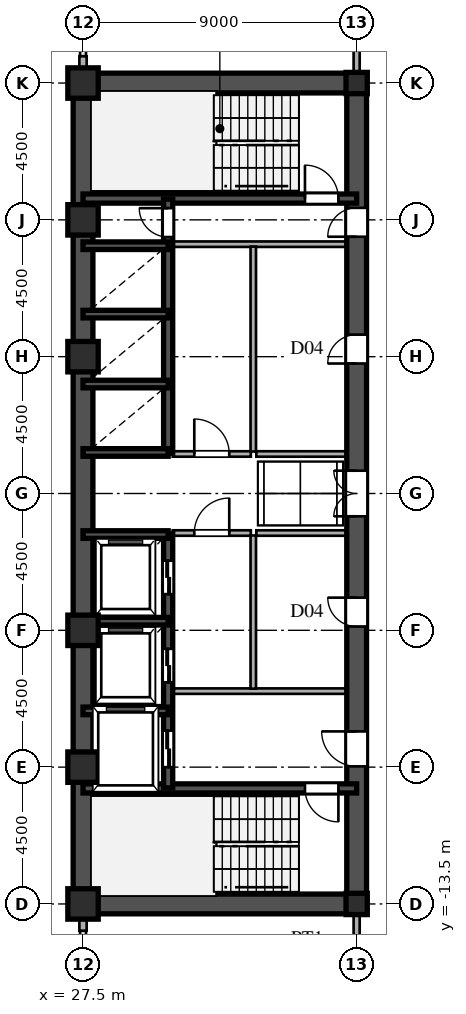
"""IFC4 building model, lengths in metres.
Left out: names, types, materials, properties, quantities, classifications, styles, units other than length and angle.
Written with IfcOpenShell. Run it as: python <this file> out.ifc"""

import sys

from ifc_helpers import new_model, si_unit, direction, frame, frame_2d, origin, origin_2d, place, context, subcontext, project, spatial, rectangle, hollow_rectangle, i_section, extrude, source, transform, mapped, element, fill, save


model = new_model("IFC4")
c1 = context("Model", 3, precision=1e-05, world=origin(), true_north=direction((0.0, 1.0)))
c2 = subcontext(c1, "Body", "Model", "MODEL_VIEW")
j1 = project(units=[si_unit("LENGTHUNIT", "METRE"), si_unit("PLANEANGLEUNIT", "RADIAN")], contexts=[c1])
p1 = place(None, origin())
s1 = spatial("IfcSite", under=j1, at=p1, CompositionType="ELEMENT")
p2 = place(p1, origin())
s2 = spatial("IfcBuilding", under=s1, at=p2, CompositionType="ELEMENT")
p3 = place(p2, frame((0.0, 0.0, 132.0)))
s3 = spatial("IfcBuildingStorey", under=s2, at=p3, CompositionType="ELEMENT", Elevation=132.0)
m1 = source(origin(), c2, "Body", "SweptSolid", [
    extrude(hollow_rectangle(XDim=1.0, YDim=1.0, WallThickness=0.042, at=origin_2d()), origin(), (0.0, 0.0, 1.0), 3.6),
])
for number, where, z_axis, x_axis in (
    (1, (27.5, -13.5, 0.0), (0.0, 0.0, 1.0), (1.0, 0.0, 0.0)),
    (2, (27.5, -9.0, 0.0), (0.0, 0.0, 1.0), (1.0, 0.0, 0.0)),
    (3, (27.5, -4.5, 0.0), (0.0, 0.0, 1.0), (1.0, 0.0, 0.0)),
    (4, (27.5, 4.5, 0.0), (0.0, 0.0, 1.0), (1.0, 0.0, 0.0)),
    (5, (27.5, 9.0, 0.0), (0.0, 0.0, 1.0), (1.0, 0.0, 0.0)),
    (6, (27.5, 13.5, 0.0), (0.0, 0.0, 1.0), (1.0, 0.0, 0.0)),
):
    element("IfcColumn", number, at=place(p3, frame(where, z_axis=z_axis, x_axis=x_axis)), inside=s3, PredefinedType="COLUMN", context=c2, shape_type="MappedRepresentation", body=[
        mapped(m1, transform((0.0, 0.0, 0.0), scale=1.0)),
    ])
m2 = source(origin(), c2, "Body", "SweptSolid", [
    extrude(i_section(OverallWidth=0.7, OverallDepth=0.7, WebThickness=0.028, FlangeThickness=0.045, at=origin_2d()), origin(), (0.0, 0.0, 1.0), 3.6),
])
for number, where, z_axis, x_axis in (
    (7, (36.5, -13.5, 0.0), (0.0, 0.0, 1.0), (1.0, 0.0, 0.0)),
    (8, (36.5, 13.5, 0.0), (0.0, 0.0, 1.0), (1.0, 0.0, 0.0)),
):
    element("IfcColumn", number, at=place(p3, frame(where, z_axis=z_axis, x_axis=x_axis)), inside=s3, PredefinedType="COLUMN", context=c2, shape_type="MappedRepresentation", body=[
        mapped(m2, transform((0.0, 0.0, 0.0), scale=1.0)),
    ])
for number, where, z_axis, x_axis in (
    (9, (27.5, -14.38, 0.0), (0.0, 0.0, 1.0), (0.0, 1.0, 0.0)),
    (10, (27.5, 13.83, 0.0), (0.0, 0.0, 1.0), (0.0, 1.0, 0.0)),
):
    element("IfcWall", number, at=place(p3, frame(where, z_axis=z_axis, x_axis=x_axis)), inside=s3, PredefinedType="SOLIDWALL", context=c2, shape_type="SweptSolid", body=[
        extrude(rectangle(XDim=0.55, YDim=0.24, at=frame_2d((0.275, 0.0))), origin(), (0.0, 0.0, 1.0), 2.79),
    ])
for number, where, z_axis, x_axis in (
    (11, (27.5, -13.5, 0.0), (0.0, 0.0, 1.0), (0.0, 1.0, 0.0)),
    (12, (27.5, 1.3, 0.0), (0.0, 0.0, 1.0), (0.0, 1.0, 0.0)),
):
    element("IfcWall", number, at=place(p3, frame(where, z_axis=z_axis, x_axis=x_axis)), inside=s3, PredefinedType="SHEAR", context=c2, shape_type="SweptSolid", body=[
        extrude(rectangle(XDim=12.2, YDim=0.65, at=frame_2d((6.1, 0.0))), origin(), (0.0, 0.0, 1.0), 3.34),
    ])
p4 = place(p3, frame((27.5, -1.3, 0.0), z_axis=(0.0, 0.0, 1.0), x_axis=(0.0, 1.0, 0.0)))
e13 = element("IfcWall", 13, at=p4, inside=s3, PredefinedType="SHEAR", context=c2, shape_type="SweptSolid", body=[
    extrude(rectangle(XDim=2.6, YDim=0.65, at=frame_2d((1.3, 0.0))), origin(), (0.0, 0.0, 1.0), 3.34),
])
for number, where, z_axis, x_axis in (
    (14, (27.5, -13.5, 0.0), (0.0, 0.0, 1.0), (1.0, 0.0, 0.0)),
    (15, (27.5, 13.5, 0.0), (0.0, 0.0, 1.0), (1.0, 0.0, 0.0)),
):
    element("IfcWall", number, at=place(p3, frame(where, z_axis=z_axis, x_axis=x_axis)), inside=s3, PredefinedType="SHEAR", context=c2, shape_type="SweptSolid", body=[
        extrude(rectangle(XDim=9.0, YDim=0.65, at=frame_2d((4.5, 0.0))), origin(), (0.0, 0.0, 1.0), 3.34),
    ])
p5 = place(p3, frame((36.5, -13.65, 0.0), z_axis=(0.0, 0.0, 1.0), x_axis=(0.0, 1.0, 0.0)))
e16 = element("IfcWall", 16, at=p5, inside=s3, PredefinedType="SHEAR", context=c2, shape_type="SweptSolid", body=[
    extrude(rectangle(XDim=7.15, YDim=0.65, at=frame_2d((3.575, 0.0))), origin(), (0.0, 0.0, 1.0), 3.34),
])
p6 = place(p5, frame((4.675, 0.0, 0.0)))
e17 = element("IfcOpeningElement", 17, at=p6, cuts=e16, PredefinedType="OPENING", context=c2, shape_type="SweptSolid", body=[
    extrude(rectangle(XDim=1.15, YDim=2.2, at=frame_2d((0.575, 1.1))), frame((0.0, 0.335, 0.0), z_axis=(0.0, -1.0, 0.0), x_axis=(1.0, 0.0, 0.0)), (0.0, 0.0, 1.0), 0.67),
])
p7 = place(p3, frame((36.5, -1.3, 0.0), z_axis=(0.0, 0.0, 1.0), x_axis=(0.0, 1.0, 0.0)))
e18 = element("IfcWall", 18, at=p7, inside=s3, PredefinedType="SHEAR", context=c2, shape_type="SweptSolid", body=[
    extrude(rectangle(XDim=2.6, YDim=0.65, at=frame_2d((1.3, 0.0))), origin(), (0.0, 0.0, 1.0), 3.34),
])
p8 = place(p7, frame((0.55, 0.0, 0.0)))
e19 = element("IfcOpeningElement", 19, at=p8, cuts=e18, PredefinedType="OPENING", context=c2, shape_type="SweptSolid", body=[
    extrude(rectangle(XDim=1.5, YDim=2.3, at=frame_2d((0.75, 1.15))), frame((0.0, 0.335, 0.0), z_axis=(0.0, -1.0, 0.0), x_axis=(1.0, 0.0, 0.0)), (0.0, 0.0, 1.0), 0.67),
])
p9 = place(p3, frame((36.5, 8.2, 0.0), z_axis=(0.0, 0.0, 1.0), x_axis=(0.0, 1.0, 0.0)))
e20 = element("IfcWall", 20, at=p9, inside=s3, PredefinedType="SHEAR", context=c2, shape_type="SweptSolid", body=[
    extrude(rectangle(XDim=5.45, YDim=0.65, at=frame_2d((2.725, 0.0))), origin(), (0.0, 0.0, 1.0), 3.34),
])
p10 = place(p9, frame((0.245, 0.0, 0.0)))
e21 = element("IfcOpeningElement", 21, at=p10, cuts=e20, PredefinedType="OPENING", context=c2, shape_type="SweptSolid", body=[
    extrude(rectangle(XDim=0.95, YDim=2.15, at=frame_2d((0.475, 1.075))), frame((0.0, 0.335, 0.0), z_axis=(0.0, -1.0, 0.0), x_axis=(1.0, 0.0, 0.0)), (0.0, 0.0, 1.0), 0.67),
])
p11 = place(p3, frame((36.5, -6.5, 0.0), z_axis=(0.0, 0.0, 1.0), x_axis=(0.0, 1.0, 0.0)))
e22 = element("IfcWall", 22, at=p11, inside=s3, PredefinedType="SHEAR", context=c2, shape_type="SweptSolid", body=[
    extrude(rectangle(XDim=5.2, YDim=0.65, at=frame_2d((2.6, 0.0))), origin(), (0.0, 0.0, 1.0), 3.34),
])
p12 = place(p11, frame((2.125, 0.0, 0.0)))
e23 = element("IfcOpeningElement", 23, at=p12, cuts=e22, PredefinedType="OPENING", context=c2, shape_type="SweptSolid", body=[
    extrude(rectangle(XDim=0.95, YDim=2.15, at=frame_2d((0.475, 1.075))), frame((0.0, 0.335, 0.0), z_axis=(0.0, -1.0, 0.0), x_axis=(1.0, 0.0, 0.0)), (0.0, 0.0, 1.0), 0.67),
])
p13 = place(p3, frame((36.5, 1.3, 0.0), z_axis=(0.0, 0.0, 1.0), x_axis=(0.0, 1.0, 0.0)))
e24 = element("IfcWall", 24, at=p13, inside=s3, PredefinedType="SHEAR", context=c2, shape_type="SweptSolid", body=[
    extrude(rectangle(XDim=6.9, YDim=0.65, at=frame_2d((3.45, 0.0))), origin(), (0.0, 0.0, 1.0), 3.34),
])
p14 = place(p13, frame((2.975, 0.0, 0.0)))
e25 = element("IfcOpeningElement", 25, at=p14, cuts=e24, PredefinedType="OPENING", context=c2, shape_type="SweptSolid", body=[
    extrude(rectangle(XDim=0.95, YDim=2.15, at=frame_2d((0.475, 1.075))), frame((0.0, 0.335, 0.0), z_axis=(0.0, -1.0, 0.0), x_axis=(1.0, 0.0, 0.0)), (0.0, 0.0, 1.0), 0.67),
])
p15 = place(p3, frame((27.5, -9.7, 0.0), z_axis=(0.0, 0.0, 1.0), x_axis=(1.0, 0.0, 0.0)))
e26 = element("IfcWall", 26, at=p15, inside=s3, PredefinedType="SHEAR", context=c2, shape_type="SweptSolid", body=[
    extrude(rectangle(XDim=9.0, YDim=0.3, at=frame_2d((4.5, 0.0))), origin(), (0.0, 0.0, 1.0), 3.34),
])
p16 = place(p15, frame((7.3, 0.0, 0.0)))
e27 = element("IfcOpeningElement", 27, at=p16, cuts=e26, PredefinedType="OPENING", context=c2, shape_type="SweptSolid", body=[
    extrude(rectangle(XDim=1.1, YDim=2.2, at=frame_2d((0.55, 1.1))), frame((0.0, 0.16, 0.0), z_axis=(0.0, -1.0, 0.0), x_axis=(1.0, 0.0, 0.0)), (0.0, 0.0, 1.0), 0.32),
])
p17 = place(p3, frame((27.5, 9.7, 0.0), z_axis=(0.0, 0.0, 1.0), x_axis=(1.0, 0.0, 0.0)))
e28 = element("IfcWall", 28, at=p17, inside=s3, PredefinedType="SHEAR", context=c2, shape_type="SweptSolid", body=[
    extrude(rectangle(XDim=9.0, YDim=0.3, at=frame_2d((4.5, 0.0))), origin(), (0.0, 0.0, 1.0), 3.34),
])
p18 = place(p17, frame((7.3, 0.0, 0.0)))
e29 = element("IfcOpeningElement", 29, at=p18, cuts=e28, PredefinedType="OPENING", context=c2, shape_type="SweptSolid", body=[
    extrude(rectangle(XDim=1.1, YDim=2.2, at=frame_2d((0.55, 1.1))), frame((0.0, 0.16, 0.0), z_axis=(0.0, -1.0, 0.0), x_axis=(1.0, 0.0, 0.0)), (0.0, 0.0, 1.0), 0.32),
])
for number, where, z_axis, x_axis in (
    (30, (27.5, -7.15, 0.0), (0.0, 0.0, 1.0), (1.0, 0.0, 0.0)),
    (31, (27.5, -4.2, 0.0), (0.0, 0.0, 1.0), (1.0, 0.0, 0.0)),
    (32, (27.5, -1.35, 0.0), (0.0, 0.0, 1.0), (1.0, 0.0, 0.0)),
    (33, (27.5, 1.35, 0.0), (0.0, 0.0, 1.0), (1.0, 0.0, 0.0)),
    (34, (27.5, 3.6, 0.0), (0.0, 0.0, 1.0), (1.0, 0.0, 0.0)),
    (35, (27.5, 5.9, 0.0), (0.0, 0.0, 1.0), (1.0, 0.0, 0.0)),
    (36, (27.5, 8.15, 0.0), (0.0, 0.0, 1.0), (1.0, 0.0, 0.0)),
):
    element("IfcWall", number, at=place(p3, frame(where, z_axis=z_axis, x_axis=x_axis)), inside=s3, PredefinedType="SHEAR", context=c2, shape_type="SweptSolid", body=[
        extrude(rectangle(XDim=2.8, YDim=0.25, at=frame_2d((1.4, 0.0))), origin(), (0.0, 0.0, 1.0), 3.34),
    ])
p19 = place(p3, frame((30.3, -9.68, 0.0), z_axis=(0.0, 0.0, 1.0), x_axis=(0.0, 1.0, 0.0)))
e37 = element("IfcWall", 37, at=p19, inside=s3, PredefinedType="SHEAR", context=c2, shape_type="SweptSolid", body=[
    extrude(rectangle(XDim=2.56, YDim=0.3, at=frame_2d((1.28, 0.0))), origin(), (0.0, 0.0, 1.0), 3.34),
])
p20 = place(p19, frame((0.68, 0.0, 0.0)))
e38 = element("IfcOpeningElement", 38, at=p20, cuts=e37, PredefinedType="OPENING", context=c2, shape_type="SweptSolid", body=[
    extrude(rectangle(XDim=1.2, YDim=2.25, at=frame_2d((0.6, 1.125))), frame((0.0, 0.16, 0.0), z_axis=(0.0, -1.0, 0.0), x_axis=(1.0, 0.0, 0.0)), (0.0, 0.0, 1.0), 0.32),
])
p21 = place(p3, frame((30.3, -7.12, 0.0), z_axis=(0.0, 0.0, 1.0), x_axis=(0.0, 1.0, 0.0)))
e39 = element("IfcWall", 39, at=p21, inside=s3, PredefinedType="SHEAR", context=c2, shape_type="SweptSolid", body=[
    extrude(rectangle(XDim=2.92, YDim=0.3, at=frame_2d((1.46, 0.0))), origin(), (0.0, 0.0, 1.0), 3.34),
])
p22 = place(p21, frame((0.91, 0.0, 0.0)))
e40 = element("IfcOpeningElement", 40, at=p22, cuts=e39, PredefinedType="OPENING", context=c2, shape_type="SweptSolid", body=[
    extrude(rectangle(XDim=1.1, YDim=2.2, at=frame_2d((0.55, 1.1))), frame((0.0, 0.16, 0.0), z_axis=(0.0, -1.0, 0.0), x_axis=(1.0, 0.0, 0.0)), (0.0, 0.0, 1.0), 0.32),
])
p23 = place(p3, frame((30.3, -4.2, 0.0), z_axis=(0.0, 0.0, 1.0), x_axis=(0.0, 1.0, 0.0)))
e41 = element("IfcWall", 41, at=p23, inside=s3, PredefinedType="SHEAR", context=c2, shape_type="SweptSolid", body=[
    extrude(rectangle(XDim=2.88, YDim=0.3, at=frame_2d((1.44, 0.0))), origin(), (0.0, 0.0, 1.0), 3.34),
])
p24 = place(p23, frame((0.89, 0.0, 0.0)))
e42 = element("IfcOpeningElement", 42, at=p24, cuts=e41, PredefinedType="OPENING", context=c2, shape_type="SweptSolid", body=[
    extrude(rectangle(XDim=1.1, YDim=2.2, at=frame_2d((0.55, 1.1))), frame((0.0, 0.16, 0.0), z_axis=(0.0, -1.0, 0.0), x_axis=(1.0, 0.0, 0.0)), (0.0, 0.0, 1.0), 0.32),
])
p25 = place(p3, frame((30.3, 1.32, 0.0), z_axis=(0.0, 0.0, 1.0), x_axis=(0.0, 1.0, 0.0)))
e43 = element("IfcWall", 43, at=p25, inside=s3, PredefinedType="SHEAR", context=c2, shape_type="SweptSolid", body=[
    extrude(rectangle(XDim=2.28, YDim=0.3, at=frame_2d((1.14, 0.0))), origin(), (0.0, 0.0, 1.0), 3.34),
])
p26 = place(p3, frame((30.3, 3.6, 0.0), z_axis=(0.0, 0.0, 1.0), x_axis=(0.0, 1.0, 0.0)))
e44 = element("IfcWall", 44, at=p26, inside=s3, PredefinedType="SHEAR", context=c2, shape_type="SweptSolid", body=[
    extrude(rectangle(XDim=2.3, YDim=0.3, at=frame_2d((1.15, 0.0))), origin(), (0.0, 0.0, 1.0), 3.34),
])
p27 = place(p3, frame((30.3, 5.9, 0.0), z_axis=(0.0, 0.0, 1.0), x_axis=(0.0, 1.0, 0.0)))
e45 = element("IfcWall", 45, at=p27, inside=s3, PredefinedType="SHEAR", context=c2, shape_type="SweptSolid", body=[
    extrude(rectangle(XDim=2.25, YDim=0.3, at=frame_2d((1.125, 0.0))), origin(), (0.0, 0.0, 1.0), 3.34),
])
p28 = place(p3, frame((30.3, 8.15, 0.0), z_axis=(0.0, 0.0, 1.0), x_axis=(0.0, 1.0, 0.0)))
e46 = element("IfcWall", 46, at=p28, inside=s3, PredefinedType="SHEAR", context=c2, shape_type="SweptSolid", body=[
    extrude(rectangle(XDim=1.53, YDim=0.3, at=frame_2d((0.765, 0.0))), origin(), (0.0, 0.0, 1.0), 3.34),
])
p29 = place(p28, frame((0.285, 0.0, 0.0)))
e47 = element("IfcOpeningElement", 47, at=p29, cuts=e46, PredefinedType="OPENING", context=c2, shape_type="SweptSolid", body=[
    extrude(rectangle(XDim=0.95, YDim=2.15, at=frame_2d((0.475, 1.075))), frame((0.0, 0.16, 0.0), z_axis=(0.0, -1.0, 0.0), x_axis=(1.0, 0.0, 0.0)), (0.0, 0.0, 1.0), 0.32),
])
for number, where, z_axis, x_axis in (
    (48, (30.45, -6.5, 0.0), (0.0, 0.0, 1.0), (1.0, 0.0, 0.0)),
    (49, (30.45, 8.2, 0.0), (0.0, 0.0, 1.0), (1.0, 0.0, 0.0)),
):
    element("IfcWall", number, at=place(p3, frame(where, z_axis=z_axis, x_axis=x_axis)), inside=s3, PredefinedType="PARTITIONING", context=c2, shape_type="SweptSolid", body=[
        extrude(rectangle(XDim=5.7, YDim=0.18, at=frame_2d((2.85, 0.0))), origin(), (0.0, 0.0, 1.0), 3.34),
    ])
p30 = place(p3, frame((33.1, -6.42, 0.0), z_axis=(0.0, 0.0, 1.0), x_axis=(0.0, 1.0, 0.0)))
e50 = element("IfcWall", 50, at=p30, inside=s3, PredefinedType="PARTITIONING", context=c2, shape_type="SweptSolid", body=[
    extrude(rectangle(XDim=5.04, YDim=0.18, at=frame_2d((2.52, 0.0))), origin(), (0.0, 0.0, 1.0), 3.34),
])
p31 = place(p3, frame((33.1, 1.38, 0.0), z_axis=(0.0, 0.0, 1.0), x_axis=(0.0, 1.0, 0.0)))
e51 = element("IfcWall", 51, at=p31, inside=s3, PredefinedType="PARTITIONING", context=c2, shape_type="SweptSolid", body=[
    extrude(rectangle(XDim=6.74, YDim=0.18, at=frame_2d((3.37, 0.0))), origin(), (0.0, 0.0, 1.0), 3.34),
])
p32 = place(p3, frame((30.45, -1.3, 0.0), z_axis=(0.0, 0.0, 1.0), x_axis=(1.0, 0.0, 0.0)))
e52 = element("IfcWall", 52, at=p32, inside=s3, PredefinedType="PARTITIONING", context=c2, shape_type="SweptSolid", body=[
    extrude(rectangle(XDim=2.57, YDim=0.18, at=frame_2d((1.285, 0.0))), origin(), (0.0, 0.0, 1.0), 3.34),
])
p33 = place(p32, frame((0.71, 0.0, 0.0)))
e53 = element("IfcOpeningElement", 53, at=p33, cuts=e52, PredefinedType="OPENING", context=c2, shape_type="SweptSolid", body=[
    extrude(rectangle(XDim=1.15, YDim=2.2, at=frame_2d((0.575, 1.1))), frame((0.0, 0.1, 0.0), z_axis=(0.0, -1.0, 0.0), x_axis=(1.0, 0.0, 0.0)), (0.0, 0.0, 1.0), 0.2),
])
p34 = place(p3, frame((30.45, 1.3, 0.0), z_axis=(0.0, 0.0, 1.0), x_axis=(1.0, 0.0, 0.0)))
e54 = element("IfcWall", 54, at=p34, inside=s3, PredefinedType="PARTITIONING", context=c2, shape_type="SweptSolid", body=[
    extrude(rectangle(XDim=2.57, YDim=0.18, at=frame_2d((1.285, 0.0))), origin(), (0.0, 0.0, 1.0), 3.34),
])
p35 = place(p34, frame((0.71, 0.0, 0.0)))
e55 = element("IfcOpeningElement", 55, at=p35, cuts=e54, PredefinedType="OPENING", context=c2, shape_type="SweptSolid", body=[
    extrude(rectangle(XDim=1.15, YDim=2.2, at=frame_2d((0.575, 1.1))), frame((0.0, 0.1, 0.0), z_axis=(0.0, -1.0, 0.0), x_axis=(1.0, 0.0, 0.0)), (0.0, 0.0, 1.0), 0.2),
])
for number, where, z_axis, x_axis in (
    (56, (33.2, -1.3, 0.0), (0.0, 0.0, 1.0), (1.0, 0.0, 0.0)),
    (57, (33.2, 1.3, 0.0), (0.0, 0.0, 1.0), (1.0, 0.0, 0.0)),
):
    element("IfcWall", number, at=place(p3, frame(where, z_axis=z_axis, x_axis=x_axis)), inside=s3, PredefinedType="PARTITIONING", context=c2, shape_type="SweptSolid", body=[
        extrude(rectangle(XDim=2.95, YDim=0.18, at=frame_2d((1.475, 0.0))), origin(), (0.0, 0.0, 1.0), 3.34),
    ])
for number, where, z_axis, x_axis in (
    (58, (36.5, -15.515, 0.0), (0.0, 0.0, 1.0), (0.0, 1.0, 0.0)),
    (59, (36.5, 13.83, 0.0), (0.0, 0.0, 1.0), (0.0, 1.0, 0.0)),
):
    element("IfcWall", number, at=place(p3, frame(where, z_axis=z_axis, x_axis=x_axis)), inside=s3, PredefinedType="PARTITIONING", context=c2, shape_type="SweptSolid", body=[
        extrude(rectangle(XDim=1.685, YDim=0.2, at=frame_2d((0.842, 0.0))), origin(), (0.0, 0.0, 1.0), 2.44),
    ])
m3 = source(origin(), c2, "Body", "SweptSolid", [
    extrude(rectangle(XDim=1.15, YDim=2.2, at=frame_2d((0.575, 1.1))), frame((0.0, 0.025, 0.0), z_axis=(0.0, -1.0, 0.0), x_axis=(1.0, 0.0, 0.0)), (0.0, 0.0, 1.0), 0.05),
])
p36 = place(p6, origin())
e60 = element("IfcDoor", 60, at=p36, inside=s3, OperationType="SINGLE_SWING_RIGHT", PredefinedType="DOOR", context=c2, shape_type="MappedRepresentation", body=[
    mapped(m3, transform((0.0, 0.0, 0.0), scale=1.0)),
])
fill(e17, e60)
m4 = source(origin(), c2, "Body", "SweptSolid", [
    extrude(rectangle(XDim=1.5, YDim=2.3, at=frame_2d((0.75, 1.15))), frame((0.0, 0.025, 0.0), z_axis=(0.0, -1.0, 0.0), x_axis=(1.0, 0.0, 0.0)), (0.0, 0.0, 1.0), 0.05),
])
p37 = place(p8, origin())
e61 = element("IfcDoor", 61, at=p37, inside=s3, OperationType="DOUBLE_SWING_LEFT", PredefinedType="DOOR", context=c2, shape_type="MappedRepresentation", body=[
    mapped(m4, transform((0.0, 0.0, 0.0), scale=1.0)),
])
fill(e19, e61)
m5 = source(origin(), c2, "Body", "SweptSolid", [
    extrude(rectangle(XDim=0.95, YDim=2.15, at=frame_2d((0.475, 1.075))), frame((0.0, 0.025, 0.0), z_axis=(0.0, -1.0, 0.0), x_axis=(1.0, 0.0, 0.0)), (0.0, 0.0, 1.0), 0.05),
])
p38 = place(p10, origin())
e62 = element("IfcDoor", 62, at=p38, inside=s3, OperationType="SINGLE_SWING_LEFT", PredefinedType="DOOR", context=c2, shape_type="MappedRepresentation", body=[
    mapped(m5, transform((0.0, 0.0, 0.0), scale=1.0)),
])
fill(e21, e62)
p39 = place(p12, origin())
e63 = element("IfcDoor", 63, at=p39, inside=s3, OperationType="SINGLE_SWING_RIGHT", PredefinedType="DOOR", context=c2, shape_type="MappedRepresentation", body=[
    mapped(m5, transform((0.0, 0.0, 0.0), scale=1.0)),
])
fill(e23, e63)
p40 = place(p14, origin())
e64 = element("IfcDoor", 64, at=p40, inside=s3, OperationType="SINGLE_SWING_LEFT", PredefinedType="DOOR", context=c2, shape_type="MappedRepresentation", body=[
    mapped(m5, transform((0.0, 0.0, 0.0), scale=1.0)),
])
fill(e25, e64)
m6 = source(origin(), c2, "Body", "SweptSolid", [
    extrude(rectangle(XDim=1.1, YDim=2.2, at=frame_2d((0.55, 1.1))), frame((0.0, 0.025, 0.0), z_axis=(0.0, -1.0, 0.0), x_axis=(1.0, 0.0, 0.0)), (0.0, 0.0, 1.0), 0.05),
])
p41 = place(p16, frame((1.1, 0.0, 0.0), z_axis=(0.0, 0.0, 1.0), x_axis=(-1.0, 0.0, 0.0)))
e65 = element("IfcDoor", 65, at=p41, inside=s3, OperationType="SINGLE_SWING_RIGHT", PredefinedType="DOOR", context=c2, shape_type="MappedRepresentation", body=[
    mapped(m6, transform((0.0, 0.0, 0.0), scale=1.0)),
])
fill(e27, e65)
p42 = place(p18, origin())
e66 = element("IfcDoor", 66, at=p42, inside=s3, OperationType="SINGLE_SWING_LEFT", PredefinedType="DOOR", context=c2, shape_type="MappedRepresentation", body=[
    mapped(m6, transform((0.0, 0.0, 0.0), scale=1.0)),
])
fill(e29, e66)
m7 = source(origin(), c2, "Body", "SweptSolid", [
    extrude(rectangle(XDim=1.2, YDim=2.25, at=frame_2d((0.6, 1.125))), frame((0.0, 0.025, 0.0), z_axis=(0.0, -1.0, 0.0), x_axis=(1.0, 0.0, 0.0)), (0.0, 0.0, 1.0), 0.05),
])
p43 = place(p20, origin())
e67 = element("IfcDoor", 67, at=p43, inside=s3, OperationType="DOUBLE_DOOR_SLIDING", PredefinedType="DOOR", context=c2, shape_type="MappedRepresentation", body=[
    mapped(m7, transform((0.0, 0.0, 0.0), scale=1.0)),
])
fill(e38, e67)
m8 = source(origin(), c2, "Body", "SweptSolid", [
    extrude(rectangle(XDim=1.1, YDim=2.2, at=frame_2d((0.55, 1.1))), frame((0.0, 0.025, 0.0), z_axis=(0.0, -1.0, 0.0), x_axis=(1.0, 0.0, 0.0)), (0.0, 0.0, 1.0), 0.05),
])
p44 = place(p22, origin())
e68 = element("IfcDoor", 68, at=p44, inside=s3, OperationType="DOUBLE_DOOR_SLIDING", PredefinedType="DOOR", context=c2, shape_type="MappedRepresentation", body=[
    mapped(m8, transform((0.0, 0.0, 0.0), scale=1.0)),
])
fill(e40, e68)
p45 = place(p24, origin())
e69 = element("IfcDoor", 69, at=p45, inside=s3, OperationType="DOUBLE_DOOR_SLIDING", PredefinedType="DOOR", context=c2, shape_type="MappedRepresentation", body=[
    mapped(m8, transform((0.0, 0.0, 0.0), scale=1.0)),
])
fill(e42, e69)
p46 = place(p29, origin())
e70 = element("IfcDoor", 70, at=p46, inside=s3, OperationType="SINGLE_SWING_RIGHT", PredefinedType="DOOR", context=c2, shape_type="MappedRepresentation", body=[
    mapped(m5, transform((0.0, 0.0, 0.0), scale=1.0)),
])
fill(e47, e70)
p47 = place(p33, origin())
e71 = element("IfcDoor", 71, at=p47, inside=s3, OperationType="SINGLE_SWING_RIGHT", PredefinedType="DOOR", context=c2, shape_type="MappedRepresentation", body=[
    mapped(m3, transform((0.0, 0.0, 0.0), scale=1.0)),
])
fill(e53, e71)
p48 = place(p35, origin())
e72 = element("IfcDoor", 72, at=p48, inside=s3, OperationType="SINGLE_SWING_LEFT", PredefinedType="DOOR", context=c2, shape_type="MappedRepresentation", body=[
    mapped(m3, transform((0.0, 0.0, 0.0), scale=1.0)),
])
fill(e55, e72)
save(model, sys.argv[1])
